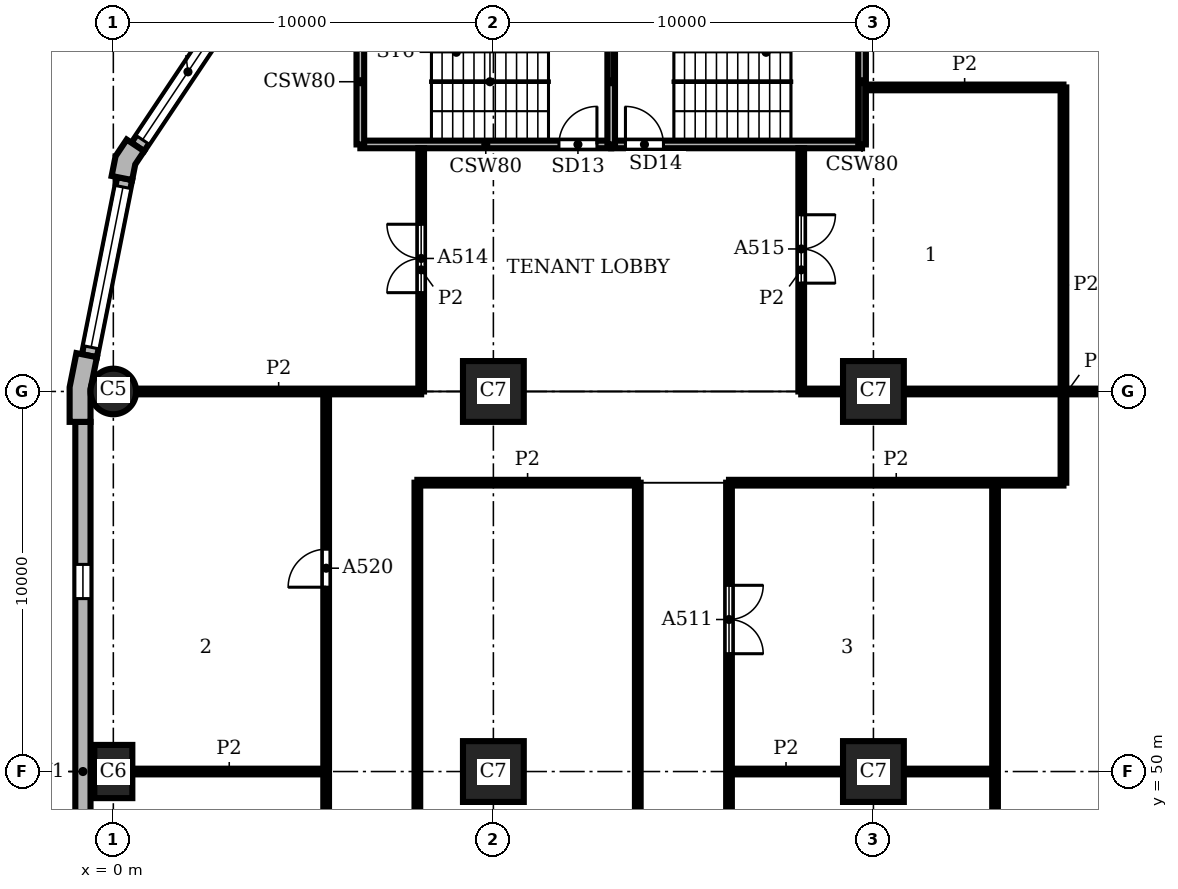
"""IFC4 building model, lengths in metres.
Left out: names, types, materials, properties, quantities, classifications, styles, units other than length and angle.
Written with IfcOpenShell. Run it as: python <this file> out.ifc"""

import sys

from ifc_helpers import new_model, si_unit, direction, frame, frame_2d, origin, origin_2d, place, context, subcontext, project, spatial, polyline, rectangle, circle, outline, extrude, element, fill, save


model = new_model("IFC4")
c1 = context("Model", 3, precision=1e-05, world=origin(), true_north=direction((0.0, 1.0)))
c2 = subcontext(c1, "Body", "Model", "MODEL_VIEW")
j1 = project(units=[si_unit("LENGTHUNIT", "METRE"), si_unit("PLANEANGLEUNIT", "RADIAN")], contexts=[c1])
p1 = place(None, origin())
s1 = spatial("IfcSite", under=j1, at=p1, CompositionType="ELEMENT")
p2 = place(p1, origin())
s2 = spatial("IfcBuilding", under=s1, at=p2, CompositionType="ELEMENT")
p3 = place(p2, frame((0.0, 0.0, 58.8)))
s3 = spatial("IfcBuildingStorey", under=s2, at=p3, CompositionType="ELEMENT", Elevation=58.8)
p4 = place(p3, frame((0.0, 60.0, 0.0), z_axis=(0.0, 0.0, 1.0), x_axis=(1.0, 0.0, 0.0)))
e1 = element("IfcColumn", 1, at=p4, inside=s3, PredefinedType="COLUMN", context=c2, shape_type="SweptSolid", body=[
    extrude(circle(Radius=0.6, at=origin_2d()), origin(), (0.0, 0.0, 1.0), 3.9),
])
p5 = place(p3, frame((0.0, 50.0, 0.0), z_axis=(0.0, 0.0, 1.0), x_axis=(0.0, 1.0, 0.0)))
e2 = element("IfcColumn", 2, at=p5, inside=s3, PredefinedType="COLUMN", context=c2, shape_type="SweptSolid", body=[
    extrude(rectangle(XDim=1.4, YDim=1.0, at=origin_2d()), origin(), (0.0, 0.0, 1.0), 3.9),
])
for number, where, z_axis, x_axis in (
    (3, (10.0, 50.0, 0.0), (0.0, 0.0, 1.0), (1.0, 0.0, 0.0)),
    (4, (10.0, 60.0, 0.0), (0.0, 0.0, 1.0), (1.0, 0.0, 0.0)),
    (5, (20.0, 50.0, 0.0), (0.0, 0.0, 1.0), (1.0, 0.0, 0.0)),
    (6, (20.0, 60.0, 0.0), (0.0, 0.0, 1.0), (1.0, 0.0, 0.0)),
):
    element("IfcColumn", number, at=place(p3, frame(where, z_axis=z_axis, x_axis=x_axis)), inside=s3, PredefinedType="COLUMN", context=c2, shape_type="SweptSolid", body=[
        extrude(rectangle(XDim=1.6, YDim=1.6, at=origin_2d()), origin(), (0.0, 0.0, 1.0), 3.9),
    ])
p6 = place(p3, origin())
e7 = element("IfcWall", 7, at=p6, inside=s3, PredefinedType="SOLIDWALL", context=c2, shape_type="SweptSolid", body=[
    extrude(outline(polyline([(0.477, 66.545), (0.352, 66.629), (0.059, 66.189), (-0.045, 65.67), (0.103, 65.641), (0.495, 65.563), (0.577, 65.974), (0.81, 66.323), (0.477, 66.545)])), origin(), (0.0, 0.0, 1.0), 3.9),
])
e8 = element("IfcWall", 8, at=p6, inside=s3, PredefinedType="SOLIDWALL", context=c2, shape_type="SweptSolid", body=[
    extrude(outline(polyline([(-0.825, 60.98), (-0.972, 61.009), (-1.15, 60.113), (-1.15, 59.2), (-1.0, 59.2), (-0.6, 59.2), (-0.6, 60.059), (-0.432, 60.902), (-0.825, 60.98)])), origin(), (0.0, 0.0, 1.0), 3.9),
])
p7 = place(p3, frame((3.284, 70.386, 0.0), z_axis=(0.0, 0.0, 1.0), x_axis=(-0.555541552266, -0.831488775454, 0.0)))
e9 = element("IfcWall", 9, at=p7, inside=s3, PredefinedType="SOLIDWALL", context=c2, shape_type="SweptSolid", body=[
    extrude(rectangle(XDim=4.753, YDim=0.4, at=frame_2d((2.376, 0.0))), origin(), (0.0, 0.0, 1.0), 3.9),
])
p8 = place(p7, frame((0.226, 0.0, 0.9)))
e10 = element("IfcOpeningElement", 10, at=p8, cuts=e9, PredefinedType="OPENING", context=c2, shape_type="SweptSolid", body=[
    extrude(rectangle(XDim=4.3, YDim=2.35, at=frame_2d((2.15, 1.175))), frame((0.0, 0.21, 0.0), z_axis=(0.0, -1.0, 0.0), x_axis=(1.0, 0.0, 0.0)), (0.0, 0.0, 1.0), 0.42),
])
p9 = place(p3, frame((0.299, 65.602, 0.0), z_axis=(0.0, 0.0, 1.0), x_axis=(-0.195098533057, -0.98078364709, 0.0)))
e11 = element("IfcWall", 11, at=p9, inside=s3, PredefinedType="SOLIDWALL", context=c2, shape_type="SweptSolid", body=[
    extrude(rectangle(XDim=4.753, YDim=0.4, at=frame_2d((2.376, 0.0))), origin(), (0.0, 0.0, 1.0), 3.9),
])
p10 = place(p9, frame((0.226, 0.0, 0.9)))
e12 = element("IfcOpeningElement", 12, at=p10, cuts=e11, PredefinedType="OPENING", context=c2, shape_type="SweptSolid", body=[
    extrude(rectangle(XDim=4.3, YDim=2.35, at=frame_2d((2.15, 1.175))), frame((0.0, 0.21, 0.0), z_axis=(0.0, -1.0, 0.0), x_axis=(1.0, 0.0, 0.0)), (0.0, 0.0, 1.0), 0.42),
])
p11 = place(p3, frame((-0.8, 59.2, 0.0), z_axis=(0.0, 0.0, 1.0), x_axis=(0.0, -1.0, 0.0)))
e13 = element("IfcWall", 13, at=p11, inside=s3, PredefinedType="SOLIDWALL", context=c2, shape_type="SweptSolid", body=[
    extrude(rectangle(XDim=18.4, YDim=0.4, at=frame_2d((9.2, 0.0))), origin(), (0.0, 0.0, 1.0), 3.9),
])
p12 = place(p11, frame((3.75, 0.0, 0.9)))
e14 = element("IfcOpeningElement", 14, at=p12, cuts=e13, PredefinedType="OPENING", context=c2, shape_type="SweptSolid", body=[
    extrude(rectangle(XDim=0.9, YDim=2.35, at=frame_2d((0.45, 1.175))), frame((0.0, 0.21, 0.0), z_axis=(0.0, -1.0, 0.0), x_axis=(1.0, 0.0, 0.0)), (0.0, 0.0, 1.0), 0.42),
])
p13 = place(p11, frame((13.75, 0.0, 0.9)))
e15 = element("IfcOpeningElement", 15, at=p13, cuts=e13, PredefinedType="OPENING", context=c2, shape_type="SweptSolid", body=[
    extrude(rectangle(XDim=0.9, YDim=2.35, at=frame_2d((0.45, 1.175))), frame((0.0, 0.21, 0.0), z_axis=(0.0, -1.0, 0.0), x_axis=(1.0, 0.0, 0.0)), (0.0, 0.0, 1.0), 0.42),
])
p14 = place(p3, frame((6.5, 66.5, 0.0), z_axis=(0.0, 0.0, 1.0), x_axis=(1.0, 0.0, 0.0)))
e16 = element("IfcWall", 16, at=p14, inside=s3, PredefinedType="SHEAR", context=c2, shape_type="SweptSolid", body=[
    extrude(rectangle(XDim=6.6, YDim=0.2, at=frame_2d((3.3, 0.0))), origin(), (0.0, 0.0, 1.0), 3.58),
])
p15 = place(p14, frame((5.225, 0.0, 0.0)))
e17 = element("IfcOpeningElement", 17, at=p15, cuts=e16, PredefinedType="OPENING", context=c2, shape_type="SweptSolid", body=[
    extrude(rectangle(XDim=1.0, YDim=2.1, at=frame_2d((0.5, 1.05))), frame((0.0, 0.11, 0.0), z_axis=(0.0, -1.0, 0.0), x_axis=(1.0, 0.0, 0.0)), (0.0, 0.0, 1.0), 0.22),
])
p16 = place(p3, frame((13.1, 66.5, 0.0), z_axis=(0.0, 0.0, 1.0), x_axis=(1.0, 0.0, 0.0)))
e18 = element("IfcWall", 18, at=p16, inside=s3, PredefinedType="SHEAR", context=c2, shape_type="SweptSolid", body=[
    extrude(rectangle(XDim=6.6, YDim=0.2, at=frame_2d((3.3, 0.0))), origin(), (0.0, 0.0, 1.0), 3.58),
])
p17 = place(p16, frame((0.375, 0.0, 0.0)))
e19 = element("IfcOpeningElement", 19, at=p17, cuts=e18, PredefinedType="OPENING", context=c2, shape_type="SweptSolid", body=[
    extrude(rectangle(XDim=1.0, YDim=2.1, at=frame_2d((0.5, 1.05))), frame((0.0, 0.11, 0.0), z_axis=(0.0, -1.0, 0.0), x_axis=(1.0, 0.0, 0.0)), (0.0, 0.0, 1.0), 0.22),
])
for number, where, z_axis, x_axis in (
    (20, (6.5, 66.5, 0.0), (0.0, 0.0, 1.0), (0.0, 1.0, 0.0)),
    (21, (13.1, 66.5, 0.0), (0.0, 0.0, 1.0), (0.0, 1.0, 0.0)),
    (22, (19.7, 66.5, 0.0), (0.0, 0.0, 1.0), (0.0, 1.0, 0.0)),
):
    element("IfcWall", number, at=place(p3, frame(where, z_axis=z_axis, x_axis=x_axis)), inside=s3, PredefinedType="SHEAR", context=c2, shape_type="SweptSolid", body=[
        extrude(rectangle(XDim=3.3, YDim=0.2, at=frame_2d((1.65, 0.0))), origin(), (0.0, 0.0, 1.0), 3.58),
    ])
p18 = place(p3, frame((5.6, 5.6, 0.0), z_axis=(0.0, 0.0, 1.0), x_axis=(0.0, 1.0, 0.0)))
e23 = element("IfcWall", 23, at=p18, inside=s3, PredefinedType="PARTITIONING", context=c2, shape_type="SweptSolid", body=[
    extrude(rectangle(XDim=54.4, YDim=0.15, at=frame_2d((27.2, 0.0))), origin(), (0.0, 0.0, 1.0), 3.58),
])
p19 = place(p18, frame((4.75, 0.0, 0.0)))
e24 = element("IfcOpeningElement", 24, at=p19, cuts=e23, PredefinedType="OPENING", context=c2, shape_type="SweptSolid", body=[
    extrude(rectangle(XDim=1.0, YDim=2.1, at=frame_2d((0.5, 1.05))), frame((0.0, 0.085, 0.0), z_axis=(0.0, -1.0, 0.0), x_axis=(1.0, 0.0, 0.0)), (0.0, 0.0, 1.0), 0.17),
])
p20 = place(p18, frame((11.0, 0.0, 0.0)))
e25 = element("IfcOpeningElement", 25, at=p20, cuts=e23, PredefinedType="OPENING", context=c2, shape_type="SweptSolid", body=[
    extrude(rectangle(XDim=1.1, YDim=2.1, at=frame_2d((0.55, 1.05))), frame((0.0, 0.085, 0.0), z_axis=(0.0, -1.0, 0.0), x_axis=(1.0, 0.0, 0.0)), (0.0, 0.0, 1.0), 0.17),
])
p21 = place(p18, frame((18.75, 0.0, 0.0)))
e26 = element("IfcOpeningElement", 26, at=p21, cuts=e23, PredefinedType="OPENING", context=c2, shape_type="SweptSolid", body=[
    extrude(rectangle(XDim=1.0, YDim=2.1, at=frame_2d((0.5, 1.05))), frame((0.0, 0.085, 0.0), z_axis=(0.0, -1.0, 0.0), x_axis=(1.0, 0.0, 0.0)), (0.0, 0.0, 1.0), 0.17),
])
p22 = place(p18, frame((28.55, 0.0, 0.0)))
e27 = element("IfcOpeningElement", 27, at=p22, cuts=e23, PredefinedType="OPENING", context=c2, shape_type="SweptSolid", body=[
    extrude(rectangle(XDim=1.0, YDim=2.1, at=frame_2d((0.5, 1.05))), frame((0.0, 0.085, 0.0), z_axis=(0.0, -1.0, 0.0), x_axis=(1.0, 0.0, 0.0)), (0.0, 0.0, 1.0), 0.17),
])
p23 = place(p18, frame((37.75, 0.0, 0.0)))
e28 = element("IfcOpeningElement", 28, at=p23, cuts=e23, PredefinedType="OPENING", context=c2, shape_type="SweptSolid", body=[
    extrude(rectangle(XDim=1.0, YDim=2.1, at=frame_2d((0.5, 1.05))), frame((0.0, 0.085, 0.0), z_axis=(0.0, -1.0, 0.0), x_axis=(1.0, 0.0, 0.0)), (0.0, 0.0, 1.0), 0.17),
])
p24 = place(p18, frame((49.25, 0.0, 0.0)))
e29 = element("IfcOpeningElement", 29, at=p24, cuts=e23, PredefinedType="OPENING", context=c2, shape_type="SweptSolid", body=[
    extrude(rectangle(XDim=1.0, YDim=2.1, at=frame_2d((0.5, 1.05))), frame((0.0, 0.085, 0.0), z_axis=(0.0, -1.0, 0.0), x_axis=(1.0, 0.0, 0.0)), (0.0, 0.0, 1.0), 0.17),
])
p25 = place(p3, frame((8.0, 33.2, 0.0), z_axis=(0.0, 0.0, 1.0), x_axis=(0.0, 1.0, 0.0)))
e30 = element("IfcWall", 30, at=p25, inside=s3, PredefinedType="PARTITIONING", context=c2, shape_type="SweptSolid", body=[
    extrude(rectangle(XDim=24.4, YDim=0.15, at=frame_2d((12.2, 0.0))), origin(), (0.0, 0.0, 1.0), 3.58),
])
p26 = place(p25, frame((12.85, 0.0, 0.0)))
e31 = element("IfcOpeningElement", 31, at=p26, cuts=e30, PredefinedType="OPENING", context=c2, shape_type="SweptSolid", body=[
    extrude(rectangle(XDim=1.0, YDim=2.1, at=frame_2d((0.5, 1.05))), frame((0.0, 0.085, 0.0), z_axis=(0.0, -1.0, 0.0), x_axis=(1.0, 0.0, 0.0)), (0.0, 0.0, 1.0), 0.17),
])
p27 = place(p3, frame((8.1, 60.0, 0.0), z_axis=(0.0, 0.0, 1.0), x_axis=(0.0, 1.0, 0.0)))
e32 = element("IfcWall", 32, at=p27, inside=s3, PredefinedType="PARTITIONING", context=c2, shape_type="SweptSolid", body=[
    extrude(rectangle(XDim=6.4, YDim=0.15, at=frame_2d((3.2, 0.0))), origin(), (0.0, 0.0, 1.0), 3.58),
])
p28 = place(p27, frame((2.6, 0.0, 0.0)))
e33 = element("IfcOpeningElement", 33, at=p28, cuts=e32, PredefinedType="OPENING", context=c2, shape_type="SweptSolid", body=[
    extrude(rectangle(XDim=1.8, YDim=2.1, at=frame_2d((0.9, 1.05))), frame((0.0, 0.085, 0.0), z_axis=(0.0, -1.0, 0.0), x_axis=(1.0, 0.0, 0.0)), (0.0, 0.0, 1.0), 0.17),
])
p29 = place(p3, frame((13.8, 33.2, 0.0), z_axis=(0.0, 0.0, 1.0), x_axis=(0.0, 1.0, 0.0)))
e34 = element("IfcWall", 34, at=p29, inside=s3, PredefinedType="PARTITIONING", context=c2, shape_type="SweptSolid", body=[
    extrude(rectangle(XDim=24.4, YDim=0.15, at=frame_2d((12.2, 0.0))), origin(), (0.0, 0.0, 1.0), 3.58),
])
p30 = place(p3, frame((16.2, 33.2, 0.0), z_axis=(0.0, 0.0, 1.0), x_axis=(0.0, 1.0, 0.0)))
e35 = element("IfcWall", 35, at=p30, inside=s3, PredefinedType="PARTITIONING", context=c2, shape_type="SweptSolid", body=[
    extrude(rectangle(XDim=24.4, YDim=0.15, at=frame_2d((12.2, 0.0))), origin(), (0.0, 0.0, 1.0), 3.58),
])
p31 = place(p30, frame((6.6, 0.0, 0.0)))
e36 = element("IfcOpeningElement", 36, at=p31, cuts=e35, PredefinedType="OPENING", context=c2, shape_type="SweptSolid", body=[
    extrude(rectangle(XDim=1.0, YDim=2.1, at=frame_2d((0.5, 1.05))), frame((0.0, 0.085, 0.0), z_axis=(0.0, -1.0, 0.0), x_axis=(1.0, 0.0, 0.0)), (0.0, 0.0, 1.0), 0.17),
])
p32 = place(p30, frame((14.15, 0.0, 0.0)))
e37 = element("IfcOpeningElement", 37, at=p32, cuts=e35, PredefinedType="OPENING", context=c2, shape_type="SweptSolid", body=[
    extrude(rectangle(XDim=1.0, YDim=2.1, at=frame_2d((0.5, 1.05))), frame((0.0, 0.085, 0.0), z_axis=(0.0, -1.0, 0.0), x_axis=(1.0, 0.0, 0.0)), (0.0, 0.0, 1.0), 0.17),
])
p33 = place(p30, frame((19.9, 0.0, 0.0)))
e38 = element("IfcOpeningElement", 38, at=p33, cuts=e35, PredefinedType="OPENING", context=c2, shape_type="SweptSolid", body=[
    extrude(rectangle(XDim=1.8, YDim=2.1, at=frame_2d((0.9, 1.05))), frame((0.0, 0.085, 0.0), z_axis=(0.0, -1.0, 0.0), x_axis=(1.0, 0.0, 0.0)), (0.0, 0.0, 1.0), 0.17),
])
p34 = place(p3, frame((18.1, 60.0, 0.0), z_axis=(0.0, 0.0, 1.0), x_axis=(0.0, 1.0, 0.0)))
e39 = element("IfcWall", 39, at=p34, inside=s3, PredefinedType="PARTITIONING", context=c2, shape_type="SweptSolid", body=[
    extrude(rectangle(XDim=6.4, YDim=0.15, at=frame_2d((3.2, 0.0))), origin(), (0.0, 0.0, 1.0), 3.58),
])
p35 = place(p34, frame((2.85, 0.0, 0.0)))
e40 = element("IfcOpeningElement", 40, at=p35, cuts=e39, PredefinedType="OPENING", context=c2, shape_type="SweptSolid", body=[
    extrude(rectangle(XDim=1.8, YDim=2.1, at=frame_2d((0.9, 1.05))), frame((0.0, 0.085, 0.0), z_axis=(0.0, -1.0, 0.0), x_axis=(1.0, 0.0, 0.0)), (0.0, 0.0, 1.0), 0.17),
])
p36 = place(p3, frame((23.2, 33.2, 0.0), z_axis=(0.0, 0.0, 1.0), x_axis=(0.0, 1.0, 0.0)))
e41 = element("IfcWall", 41, at=p36, inside=s3, PredefinedType="PARTITIONING", context=c2, shape_type="SweptSolid", body=[
    extrude(rectangle(XDim=24.4, YDim=0.15, at=frame_2d((12.2, 0.0))), origin(), (0.0, 0.0, 1.0), 3.58),
])
p37 = place(p3, frame((25.0, 57.6, 0.0), z_axis=(0.0, 0.0, 1.0), x_axis=(0.0, 1.0, 0.0)))
e42 = element("IfcWall", 42, at=p37, inside=s3, PredefinedType="PARTITIONING", context=c2, shape_type="SweptSolid", body=[
    extrude(rectangle(XDim=10.4, YDim=0.15, at=frame_2d((5.2, 0.0))), origin(), (0.0, 0.0, 1.0), 3.58),
])
p38 = place(p3, frame((0.5, 50.0, 0.0), z_axis=(0.0, 0.0, 1.0), x_axis=(1.0, 0.0, 0.0)))
e43 = element("IfcWall", 43, at=p38, inside=s3, PredefinedType="PARTITIONING", context=c2, shape_type="SweptSolid", body=[
    extrude(rectangle(XDim=5.1, YDim=0.15, at=frame_2d((2.55, 0.0))), origin(), (0.0, 0.0, 1.0), 3.58),
])
p39 = place(p3, frame((16.2, 50.0, 0.0), z_axis=(0.0, 0.0, 1.0), x_axis=(1.0, 0.0, 0.0)))
e44 = element("IfcWall", 44, at=p39, inside=s3, PredefinedType="PARTITIONING", context=c2, shape_type="SweptSolid", body=[
    extrude(rectangle(XDim=3.0, YDim=0.15, at=frame_2d((1.5, 0.0))), origin(), (0.0, 0.0, 1.0), 3.58),
])
p40 = place(p3, frame((20.8, 50.0, 0.0), z_axis=(0.0, 0.0, 1.0), x_axis=(1.0, 0.0, 0.0)))
e45 = element("IfcWall", 45, at=p40, inside=s3, PredefinedType="PARTITIONING", context=c2, shape_type="SweptSolid", body=[
    extrude(rectangle(XDim=2.4, YDim=0.15, at=frame_2d((1.2, 0.0))), origin(), (0.0, 0.0, 1.0), 3.58),
])
p41 = place(p3, frame((8.0, 57.6, 0.0), z_axis=(0.0, 0.0, 1.0), x_axis=(1.0, 0.0, 0.0)))
e46 = element("IfcWall", 46, at=p41, inside=s3, PredefinedType="PARTITIONING", context=c2, shape_type="SweptSolid", body=[
    extrude(rectangle(XDim=5.8, YDim=0.15, at=frame_2d((2.9, 0.0))), origin(), (0.0, 0.0, 1.0), 3.58),
])
p42 = place(p3, frame((16.2, 57.6, 0.0), z_axis=(0.0, 0.0, 1.0), x_axis=(1.0, 0.0, 0.0)))
e47 = element("IfcWall", 47, at=p42, inside=s3, PredefinedType="PARTITIONING", context=c2, shape_type="SweptSolid", body=[
    extrude(rectangle(XDim=8.8, YDim=0.15, at=frame_2d((4.4, 0.0))), origin(), (0.0, 0.0, 1.0), 3.58),
])
p43 = place(p3, frame((0.6, 60.0, 0.0), z_axis=(0.0, 0.0, 1.0), x_axis=(1.0, 0.0, 0.0)))
e48 = element("IfcWall", 48, at=p43, inside=s3, PredefinedType="PARTITIONING", context=c2, shape_type="SweptSolid", body=[
    extrude(rectangle(XDim=7.5, YDim=0.15, at=frame_2d((3.75, 0.0))), origin(), (0.0, 0.0, 1.0), 3.58),
])
p44 = place(p3, frame((18.1, 60.0, 0.0), z_axis=(0.0, 0.0, 1.0), x_axis=(1.0, 0.0, 0.0)))
e49 = element("IfcWall", 49, at=p44, inside=s3, PredefinedType="PARTITIONING", context=c2, shape_type="SweptSolid", body=[
    extrude(rectangle(XDim=1.1, YDim=0.15, at=frame_2d((0.55, 0.0))), origin(), (0.0, 0.0, 1.0), 3.58),
])
p45 = place(p3, frame((20.8, 60.0, 0.0), z_axis=(0.0, 0.0, 1.0), x_axis=(1.0, 0.0, 0.0)))
e50 = element("IfcWall", 50, at=p45, inside=s3, PredefinedType="PARTITIONING", context=c2, shape_type="SweptSolid", body=[
    extrude(rectangle(XDim=8.6, YDim=0.15, at=frame_2d((4.3, 0.0))), origin(), (0.0, 0.0, 1.0), 3.58),
])
p46 = place(p3, frame((19.8, 68.0, 0.0), z_axis=(0.0, 0.0, 1.0), x_axis=(1.0, 0.0, 0.0)))
e51 = element("IfcWall", 51, at=p46, inside=s3, PredefinedType="PARTITIONING", context=c2, shape_type="SweptSolid", body=[
    extrude(rectangle(XDim=5.2, YDim=0.15, at=frame_2d((2.6, 0.0))), origin(), (0.0, 0.0, 1.0), 3.58),
])
p47 = place(p8, origin())
e52 = element("IfcWindow", 52, at=p47, inside=s3, PartitioningType="SINGLE_PANEL", PredefinedType="WINDOW", context=c2, shape_type="SweptSolid", body=[
    extrude(rectangle(XDim=4.3, YDim=2.35, at=frame_2d((2.15, 1.175))), frame((0.0, 0.16, 0.0), z_axis=(0.0, -1.0, 0.0), x_axis=(1.0, 0.0, 0.0)), (0.0, 0.0, 1.0), 0.06),
])
fill(e10, e52)
p48 = place(p10, origin())
e53 = element("IfcWindow", 53, at=p48, inside=s3, PartitioningType="SINGLE_PANEL", PredefinedType="WINDOW", context=c2, shape_type="SweptSolid", body=[
    extrude(rectangle(XDim=4.3, YDim=2.35, at=frame_2d((2.15, 1.175))), frame((0.0, 0.16, 0.0), z_axis=(0.0, -1.0, 0.0), x_axis=(1.0, 0.0, 0.0)), (0.0, 0.0, 1.0), 0.06),
])
fill(e12, e53)
p49 = place(p12, origin())
e54 = element("IfcWindow", 54, at=p49, inside=s3, PartitioningType="SINGLE_PANEL", PredefinedType="WINDOW", context=c2, shape_type="SweptSolid", body=[
    extrude(rectangle(XDim=0.9, YDim=2.35, at=frame_2d((0.45, 1.175))), frame((0.0, 0.16, 0.0), z_axis=(0.0, -1.0, 0.0), x_axis=(1.0, 0.0, 0.0)), (0.0, 0.0, 1.0), 0.06),
])
fill(e14, e54)
p50 = place(p15, origin())
e55 = element("IfcDoor", 55, at=p50, inside=s3, OperationType="SINGLE_SWING_RIGHT", PredefinedType="DOOR", context=c2, shape_type="SweptSolid", body=[
    extrude(rectangle(XDim=1.0, YDim=2.1, at=frame_2d((0.5, 1.05))), frame((0.0, 0.025, 0.0), z_axis=(0.0, -1.0, 0.0), x_axis=(1.0, 0.0, 0.0)), (0.0, 0.0, 1.0), 0.05),
])
fill(e17, e55)
p51 = place(p17, origin())
e56 = element("IfcDoor", 56, at=p51, inside=s3, OperationType="SINGLE_SWING_LEFT", PredefinedType="DOOR", context=c2, shape_type="SweptSolid", body=[
    extrude(rectangle(XDim=1.0, YDim=2.1, at=frame_2d((0.5, 1.05))), frame((0.0, 0.025, 0.0), z_axis=(0.0, -1.0, 0.0), x_axis=(1.0, 0.0, 0.0)), (0.0, 0.0, 1.0), 0.05),
])
fill(e19, e56)
p52 = place(p33, frame((1.8, 0.0, 0.0), z_axis=(0.0, 0.0, 1.0), x_axis=(-1.0, 0.0, 0.0)))
e57 = element("IfcDoor", 57, at=p52, inside=s3, OperationType="DOUBLE_DOOR_SINGLE_SWING", PredefinedType="DOOR", context=c2, shape_type="SweptSolid", body=[
    extrude(rectangle(XDim=1.8, YDim=2.1, at=frame_2d((0.9, 1.05))), frame((0.0, 0.025, 0.0), z_axis=(0.0, -1.0, 0.0), x_axis=(1.0, 0.0, 0.0)), (0.0, 0.0, 1.0), 0.05),
])
fill(e38, e57)
p53 = place(p28, origin())
e58 = element("IfcDoor", 58, at=p53, inside=s3, OperationType="DOUBLE_DOOR_SINGLE_SWING", PredefinedType="DOOR", context=c2, shape_type="SweptSolid", body=[
    extrude(rectangle(XDim=1.8, YDim=2.1, at=frame_2d((0.9, 1.05))), frame((0.0, 0.025, 0.0), z_axis=(0.0, -1.0, 0.0), x_axis=(1.0, 0.0, 0.0)), (0.0, 0.0, 1.0), 0.05),
])
fill(e33, e58)
p54 = place(p35, frame((1.8, 0.0, 0.0), z_axis=(0.0, 0.0, 1.0), x_axis=(-1.0, 0.0, 0.0)))
e59 = element("IfcDoor", 59, at=p54, inside=s3, OperationType="DOUBLE_DOOR_SINGLE_SWING", PredefinedType="DOOR", context=c2, shape_type="SweptSolid", body=[
    extrude(rectangle(XDim=1.8, YDim=2.1, at=frame_2d((0.9, 1.05))), frame((0.0, 0.025, 0.0), z_axis=(0.0, -1.0, 0.0), x_axis=(1.0, 0.0, 0.0)), (0.0, 0.0, 1.0), 0.05),
])
fill(e40, e59)
p55 = place(p24, origin())
e60 = element("IfcDoor", 60, at=p55, inside=s3, OperationType="SINGLE_SWING_LEFT", PredefinedType="DOOR", context=c2, shape_type="SweptSolid", body=[
    extrude(rectangle(XDim=1.0, YDim=2.1, at=frame_2d((0.5, 1.05))), frame((0.0, 0.025, 0.0), z_axis=(0.0, -1.0, 0.0), x_axis=(1.0, 0.0, 0.0)), (0.0, 0.0, 1.0), 0.05),
])
fill(e29, e60)
save(model, sys.argv[1])
